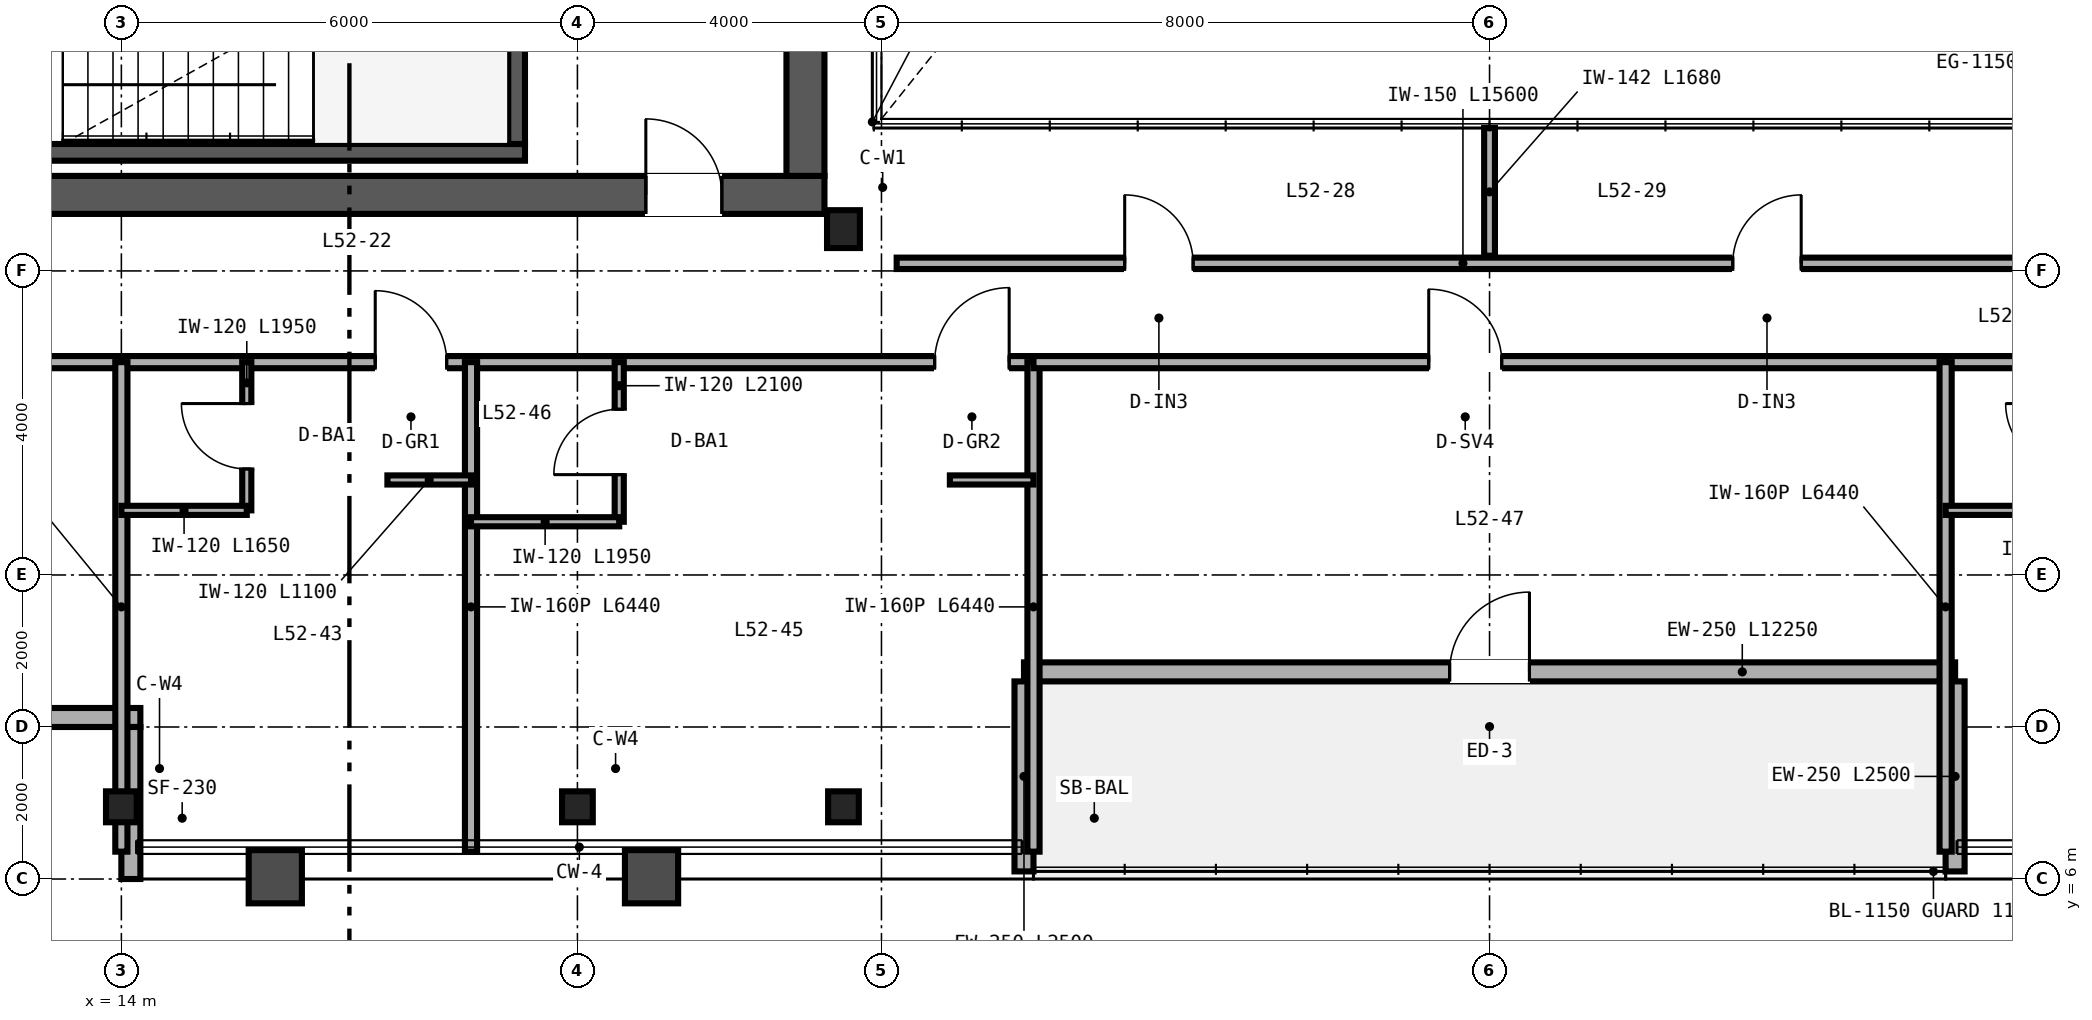
"""IFC4 building model, lengths in metres.
Left out: names, types, materials, properties, quantities, classifications, styles, units other than length and angle.
Written with IfcOpenShell. Run it as: python <this file> out.ifc"""

import sys

from ifc_helpers import new_model, si_unit, direction, frame, frame_2d, origin, origin_2d, place, context, subcontext, project, spatial, rectangle, i_section, extrude, source, transform, mapped, element, fill, save


model = new_model("IFC4")
c1 = context("Model", 3, precision=1e-05, world=origin(), true_north=direction((0.0, 1.0)))
c2 = subcontext(c1, "Body", "Model", "MODEL_VIEW")
j1 = project(units=[si_unit("LENGTHUNIT", "METRE"), si_unit("PLANEANGLEUNIT", "RADIAN")], contexts=[c1])
p1 = place(None, origin())
s1 = spatial("IfcSite", under=j1, at=p1, CompositionType="ELEMENT")
p2 = place(p1, origin())
s2 = spatial("IfcBuilding", under=s1, at=p2, CompositionType="ELEMENT")
p3 = place(p2, frame((0.0, 0.0, 206.4)))
s3 = spatial("IfcBuildingStorey", under=s2, at=p3, CompositionType="ELEMENT", Elevation=206.4)
p4 = place(p3, frame((10.75, 15.0, 0.0), z_axis=(0.0, 0.0, 1.0), x_axis=(1.0, 0.0, 0.0)))
e1 = element("IfcWall", 1, at=p4, inside=s3, PredefinedType="SHEAR", context=c2, shape_type="SweptSolid", body=[
    extrude(rectangle(XDim=12.5, YDim=0.5, at=frame_2d((6.25, 0.0))), origin(), (0.0, 0.0, 1.0), 3.37),
])
p5 = place(p4, frame((10.15, 0.0, 0.0)))
e2 = element("IfcOpeningElement", 2, at=p5, cuts=e1, PredefinedType="OPENING", context=c2, shape_type="SweptSolid", body=[
    extrude(rectangle(XDim=1.0, YDim=2.15, at=frame_2d((0.5, 1.075))), frame((0.0, 0.26, 0.0), z_axis=(0.0, -1.0, 0.0), x_axis=(1.0, 0.0, 0.0)), (0.0, 0.0, 1.0), 0.52),
])
p6 = place(p3, frame((23.0, 15.25, 0.0), z_axis=(0.0, 0.0, 1.0), x_axis=(0.0, 1.0, 0.0)))
e3 = element("IfcWall", 3, at=p6, inside=s3, PredefinedType="SHEAR", context=c2, shape_type="SweptSolid", body=[
    extrude(rectangle(XDim=21.5, YDim=0.5, at=frame_2d((10.75, 0.0))), origin(), (0.0, 0.0, 1.0), 3.37),
])
p7 = place(p3, frame((11.25, 15.56, 0.0), z_axis=(0.0, 0.0, 1.0), x_axis=(1.0, 0.0, 0.0)))
e4 = element("IfcWall", 4, at=p7, inside=s3, PredefinedType="SHEAR", context=c2, shape_type="SweptSolid", body=[
    extrude(rectangle(XDim=8.06, YDim=0.22, at=frame_2d((4.03, 0.0))), origin(), (0.0, 0.0, 1.0), 3.4),
])
p8 = place(p3, frame((19.2, 15.67, 0.0), z_axis=(0.0, 0.0, 1.0), x_axis=(0.0, 1.0, 0.0)))
e5 = element("IfcWall", 5, at=p8, inside=s3, PredefinedType="SHEAR", context=c2, shape_type="SweptSolid", body=[
    extrude(rectangle(XDim=3.28, YDim=0.22, at=frame_2d((1.64, 0.0))), origin(), (0.0, 0.0, 1.0), 3.4),
])
m1 = source(origin(), c2, "Body", "SweptSolid", [
    extrude(i_section(OverallWidth=0.432, OverallDepth=0.498, WebThickness=0.056, FlangeThickness=0.089, FilletRadius=0.025, at=origin_2d()), origin(), (0.0, 0.0, 1.0), 3.37),
])
p9 = place(p3, frame((23.5, 14.55, 0.0), z_axis=(0.0, 0.0, 1.0), x_axis=(1.0, 0.0, 0.0)))
e6 = element("IfcColumn", 6, at=p9, inside=s3, PredefinedType="COLUMN", context=c2, shape_type="MappedRepresentation", body=[
    mapped(m1, transform((0.0, 0.0, 0.0), scale=1.0)),
])
m2 = source(origin(), c2, "Body", "SweptSolid", [
    extrude(i_section(OverallWidth=0.404, OverallDepth=0.407, WebThickness=0.027, FlangeThickness=0.044, FilletRadius=0.025, at=origin_2d()), origin(), (0.0, 0.0, 1.0), 3.37),
])
for number, where, z_axis, x_axis in (
    (7, (14.0, 6.95, 0.0), (0.0, 0.0, 1.0), (1.0, 0.0, 0.0)),
    (8, (20.0, 6.95, 0.0), (0.0, 0.0, 1.0), (1.0, 0.0, 0.0)),
    (9, (23.5, 6.95, 0.0), (0.0, 0.0, 1.0), (1.0, 0.0, 0.0)),
):
    element("IfcColumn", number, at=place(p3, frame(where, z_axis=z_axis, x_axis=x_axis)), inside=s3, PredefinedType="COLUMN", context=c2, shape_type="MappedRepresentation", body=[
        mapped(m2, transform((0.0, 0.0, 0.0), scale=1.0)),
    ])
p10 = place(p3, frame((12.25, 8.125, 0.0), z_axis=(0.0, 0.0, 1.0), x_axis=(1.0, 0.0, 0.0)))
e10 = element("IfcWall", 10, at=p10, inside=s3, PredefinedType="SOLIDWALL", context=c2, shape_type="SweptSolid", body=[
    extrude(rectangle(XDim=2.0, YDim=0.25, at=frame_2d((1.0, 0.0))), origin(), (0.0, 0.0, 1.0), 3.37),
])
p11 = place(p3, frame((14.125, 8.0, 0.0), z_axis=(0.0, 0.0, 1.0), x_axis=(0.0, -1.0, 0.0)))
e11 = element("IfcWall", 11, at=p11, inside=s3, PredefinedType="SOLIDWALL", context=c2, shape_type="SweptSolid", body=[
    extrude(rectangle(XDim=2.0, YDim=0.25, at=frame_2d((1.0, 0.0))), origin(), (0.0, 0.0, 1.0), 2.677),
])
p12 = place(p3, frame((25.875, 8.725, 0.0), z_axis=(0.0, 0.0, 1.0), x_axis=(1.0, 0.0, 0.0)))
e12 = element("IfcWall", 12, at=p12, inside=s3, PredefinedType="SOLIDWALL", context=c2, shape_type="SweptSolid", body=[
    extrude(rectangle(XDim=12.25, YDim=0.25, at=frame_2d((6.125, 0.0))), origin(), (0.0, 0.0, 1.0), 3.37),
])
p13 = place(p12, frame((5.6, 0.0, 0.0)))
e13 = element("IfcOpeningElement", 13, at=p13, cuts=e12, PredefinedType="OPENING", context=c2, shape_type="SweptSolid", body=[
    extrude(rectangle(XDim=1.05, YDim=2.15, at=frame_2d((0.525, 1.075))), frame((0.0, 0.135, 0.0), z_axis=(0.0, -1.0, 0.0), x_axis=(1.0, 0.0, 0.0)), (0.0, 0.0, 1.0), 0.27),
])
for number, where, z_axis, x_axis in (
    (14, (25.875, 6.1, 0.0), (0.0, 0.0, 1.0), (0.0, 1.0, 0.0)),
    (15, (38.125, 6.1, 0.0), (0.0, 0.0, 1.0), (0.0, 1.0, 0.0)),
):
    element("IfcWall", number, at=place(p3, frame(where, z_axis=z_axis, x_axis=x_axis)), inside=s3, PredefinedType="SOLIDWALL", context=c2, shape_type="SweptSolid", body=[
        extrude(rectangle(XDim=2.5, YDim=0.25, at=frame_2d((1.25, 0.0))), origin(), (0.0, 0.0, 1.0), 2.443),
    ])
p14 = place(p3, frame((24.2, 14.1, 0.0), z_axis=(0.0, 0.0, 1.0), x_axis=(1.0, 0.0, 0.0)))
e16 = element("IfcWall", 16, at=p14, inside=s3, PredefinedType="PARTITIONING", context=c2, shape_type="SweptSolid", body=[
    extrude(rectangle(XDim=15.6, YDim=0.15, at=frame_2d((7.8, 0.0))), origin(), (0.0, 0.0, 1.0), 3.37),
])
p15 = place(p14, frame((3.0, 0.0, 0.0)))
e17 = element("IfcOpeningElement", 17, at=p15, cuts=e16, PredefinedType="OPENING", context=c2, shape_type="SweptSolid", body=[
    extrude(rectangle(XDim=0.9, YDim=2.15, at=frame_2d((0.45, 1.075))), frame((0.0, 0.085, 0.0), z_axis=(0.0, -1.0, 0.0), x_axis=(1.0, 0.0, 0.0)), (0.0, 0.0, 1.0), 0.17),
])
p16 = place(p14, frame((11.0, 0.0, 0.0)))
e18 = element("IfcOpeningElement", 18, at=p16, cuts=e16, PredefinedType="OPENING", context=c2, shape_type="SweptSolid", body=[
    extrude(rectangle(XDim=0.9, YDim=2.15, at=frame_2d((0.45, 1.075))), frame((0.0, 0.085, 0.0), z_axis=(0.0, -1.0, 0.0), x_axis=(1.0, 0.0, 0.0)), (0.0, 0.0, 1.0), 0.17),
])
p17 = place(p3, frame((32.0, 14.2, 0.0), z_axis=(0.0, 0.0, 1.0), x_axis=(0.0, 1.0, 0.0)))
e19 = element("IfcWall", 19, at=p17, inside=s3, PredefinedType="PARTITIONING", context=c2, shape_type="SweptSolid", body=[
    extrude(rectangle(XDim=1.68, YDim=0.142, at=frame_2d((0.84, 0.0))), origin(), (0.0, 0.0, 1.0), 3.37),
])
p18 = place(p3, frame((10.0, 12.8, 0.0), z_axis=(0.0, 0.0, 1.0), x_axis=(1.0, 0.0, 0.0)))
e20 = element("IfcWall", 20, at=p18, inside=s3, PredefinedType="PARTITIONING", context=c2, shape_type="SweptSolid", body=[
    extrude(rectangle(XDim=4.0, YDim=0.16, at=frame_2d((2.0, 0.0))), origin(), (0.0, 0.0, 1.0), 3.37),
])
p19 = place(p18, frame((1.52, 0.0, 0.0)))
e21 = element("IfcOpeningElement", 21, at=p19, cuts=e20, PredefinedType="OPENING", context=c2, shape_type="SweptSolid", body=[
    extrude(rectangle(XDim=0.96, YDim=2.15, at=frame_2d((0.48, 1.075))), frame((0.0, 0.09, 0.0), z_axis=(0.0, -1.0, 0.0), x_axis=(1.0, 0.0, 0.0)), (0.0, 0.0, 1.0), 0.18),
])
p20 = place(p3, frame((14.0, 12.8, 0.0), z_axis=(0.0, 0.0, 1.0), x_axis=(1.0, 0.0, 0.0)))
e22 = element("IfcWall", 22, at=p20, inside=s3, PredefinedType="PARTITIONING", context=c2, shape_type="SweptSolid", body=[
    extrude(rectangle(XDim=12.0, YDim=0.16, at=frame_2d((6.0, 0.0))), origin(), (0.0, 0.0, 1.0), 2.913),
])
p21 = place(p20, frame((3.34, 0.0, 0.0)))
e23 = element("IfcOpeningElement", 23, at=p21, cuts=e22, PredefinedType="OPENING", context=c2, shape_type="SweptSolid", body=[
    extrude(rectangle(XDim=0.94, YDim=2.15, at=frame_2d((0.47, 1.075))), frame((0.0, 0.09, 0.0), z_axis=(0.0, -1.0, 0.0), x_axis=(1.0, 0.0, 0.0)), (0.0, 0.0, 1.0), 0.18),
])
p22 = place(p20, frame((10.7, 0.0, 0.0)))
e24 = element("IfcOpeningElement", 24, at=p22, cuts=e22, PredefinedType="OPENING", context=c2, shape_type="SweptSolid", body=[
    extrude(rectangle(XDim=0.98, YDim=2.2, at=frame_2d((0.49, 1.1))), frame((0.0, 0.09, 0.0), z_axis=(0.0, -1.0, 0.0), x_axis=(1.0, 0.0, 0.0)), (0.0, 0.0, 1.0), 0.18),
])
p23 = place(p3, frame((14.0, 6.36, 0.0), z_axis=(0.0, 0.0, 1.0), x_axis=(0.0, 1.0, 0.0)))
e25 = element("IfcWall", 25, at=p23, inside=s3, PredefinedType="PARTITIONING", context=c2, shape_type="SweptSolid", body=[
    extrude(rectangle(XDim=6.44, YDim=0.16, at=frame_2d((3.22, 0.0))), origin(), (0.0, 0.0, 1.0), 2.677),
])
p24 = place(p3, frame((26.0, 6.36, 0.0), z_axis=(0.0, 0.0, 1.0), x_axis=(0.0, 1.0, 0.0)))
e26 = element("IfcWall", 26, at=p24, inside=s3, PredefinedType="PARTITIONING", context=c2, shape_type="SweptSolid", body=[
    extrude(rectangle(XDim=6.44, YDim=0.16, at=frame_2d((3.22, 0.0))), origin(), (0.0, 0.0, 1.0), 2.443),
])
p25 = place(p3, frame((18.6, 6.36, 0.0), z_axis=(0.0, 0.0, 1.0), x_axis=(0.0, 1.0, 0.0)))
e27 = element("IfcWall", 27, at=p25, inside=s3, PredefinedType="PARTITIONING", context=c2, shape_type="SweptSolid", body=[
    extrude(rectangle(XDim=6.44, YDim=0.16, at=frame_2d((3.22, 0.0))), origin(), (0.0, 0.0, 1.0), 2.677),
])
p26 = place(p3, frame((15.65, 10.85, 0.0), z_axis=(0.0, 0.0, 1.0), x_axis=(0.0, 1.0, 0.0)))
e28 = element("IfcWall", 28, at=p26, inside=s3, PredefinedType="PARTITIONING", context=c2, shape_type="SweptSolid", body=[
    extrude(rectangle(XDim=1.95, YDim=0.12, at=frame_2d((0.975, 0.0))), origin(), (0.0, 0.0, 1.0), 3.37),
])
p27 = place(p26, frame((0.545, 0.0, 0.0)))
e29 = element("IfcOpeningElement", 29, at=p27, cuts=e28, PredefinedType="OPENING", context=c2, shape_type="SweptSolid", body=[
    extrude(rectangle(XDim=0.86, YDim=2.1, at=frame_2d((0.43, 1.05))), frame((0.0, 0.07, 0.0), z_axis=(0.0, -1.0, 0.0), x_axis=(1.0, 0.0, 0.0)), (0.0, 0.0, 1.0), 0.14),
])
p28 = place(p3, frame((14.0, 10.85, 0.0), z_axis=(0.0, 0.0, 1.0), x_axis=(1.0, 0.0, 0.0)))
e30 = element("IfcWall", 30, at=p28, inside=s3, PredefinedType="PARTITIONING", context=c2, shape_type="SweptSolid", body=[
    extrude(rectangle(XDim=1.65, YDim=0.12, at=frame_2d((0.825, 0.0))), origin(), (0.0, 0.0, 1.0), 3.37),
])
p29 = place(p3, frame((17.5, 11.25, 0.0), z_axis=(0.0, 0.0, 1.0), x_axis=(1.0, 0.0, 0.0)))
e31 = element("IfcWall", 31, at=p29, inside=s3, PredefinedType="PARTITIONING", context=c2, shape_type="SweptSolid", body=[
    extrude(rectangle(XDim=1.1, YDim=0.12, at=frame_2d((0.55, 0.0))), origin(), (0.0, 0.0, 1.0), 3.37),
])
p30 = place(p3, frame((20.55, 10.7, 0.0), z_axis=(0.0, 0.0, 1.0), x_axis=(0.0, 1.0, 0.0)))
e32 = element("IfcWall", 32, at=p30, inside=s3, PredefinedType="PARTITIONING", context=c2, shape_type="SweptSolid", body=[
    extrude(rectangle(XDim=2.1, YDim=0.12, at=frame_2d((1.05, 0.0))), origin(), (0.0, 0.0, 1.0), 3.37),
])
p31 = place(p30, frame((0.62, 0.0, 0.0)))
e33 = element("IfcOpeningElement", 33, at=p31, cuts=e32, PredefinedType="OPENING", context=c2, shape_type="SweptSolid", body=[
    extrude(rectangle(XDim=0.86, YDim=2.1, at=frame_2d((0.43, 1.05))), frame((0.0, 0.07, 0.0), z_axis=(0.0, -1.0, 0.0), x_axis=(1.0, 0.0, 0.0)), (0.0, 0.0, 1.0), 0.14),
])
p32 = place(p3, frame((18.6, 10.7, 0.0), z_axis=(0.0, 0.0, 1.0), x_axis=(1.0, 0.0, 0.0)))
e34 = element("IfcWall", 34, at=p32, inside=s3, PredefinedType="PARTITIONING", context=c2, shape_type="SweptSolid", body=[
    extrude(rectangle(XDim=1.95, YDim=0.12, at=frame_2d((0.975, 0.0))), origin(), (0.0, 0.0, 1.0), 3.37),
])
p33 = place(p3, frame((24.9, 11.25, 0.0), z_axis=(0.0, 0.0, 1.0), x_axis=(1.0, 0.0, 0.0)))
e35 = element("IfcWall", 35, at=p33, inside=s3, PredefinedType="PARTITIONING", context=c2, shape_type="SweptSolid", body=[
    extrude(rectangle(XDim=1.1, YDim=0.12, at=frame_2d((0.55, 0.0))), origin(), (0.0, 0.0, 1.0), 3.37),
])
p34 = place(p3, frame((26.0, 12.8, 0.0), z_axis=(0.0, 0.0, 1.0), x_axis=(1.0, 0.0, 0.0)))
e36 = element("IfcWall", 36, at=p34, inside=s3, PredefinedType="PARTITIONING", context=c2, shape_type="SweptSolid", body=[
    extrude(rectangle(XDim=12.0, YDim=0.16, at=frame_2d((6.0, 0.0))), origin(), (0.0, 0.0, 1.0), 3.37),
])
p35 = place(p34, frame((5.2, 0.0, 0.0)))
e37 = element("IfcOpeningElement", 37, at=p35, cuts=e36, PredefinedType="OPENING", context=c2, shape_type="SweptSolid", body=[
    extrude(rectangle(XDim=0.96, YDim=2.15, at=frame_2d((0.48, 1.075))), frame((0.0, 0.09, 0.0), z_axis=(0.0, -1.0, 0.0), x_axis=(1.0, 0.0, 0.0)), (0.0, 0.0, 1.0), 0.18),
])
p36 = place(p3, frame((38.0, 12.8, 0.0), z_axis=(0.0, 0.0, 1.0), x_axis=(1.0, 0.0, 0.0)))
e38 = element("IfcWall", 38, at=p36, inside=s3, PredefinedType="PARTITIONING", context=c2, shape_type="SweptSolid", body=[
    extrude(rectangle(XDim=12.0, YDim=0.16, at=frame_2d((6.0, 0.0))), origin(), (0.0, 0.0, 1.0), 2.913),
])
p37 = place(p36, frame((3.14, 0.0, 0.0)))
e39 = element("IfcOpeningElement", 39, at=p37, cuts=e38, PredefinedType="OPENING", context=c2, shape_type="SweptSolid", body=[
    extrude(rectangle(XDim=0.94, YDim=2.15, at=frame_2d((0.47, 1.075))), frame((0.0, 0.09, 0.0), z_axis=(0.0, -1.0, 0.0), x_axis=(1.0, 0.0, 0.0)), (0.0, 0.0, 1.0), 0.18),
])
p38 = place(p36, frame((6.94, 0.0, 0.0)))
e40 = element("IfcOpeningElement", 40, at=p38, cuts=e38, PredefinedType="OPENING", context=c2, shape_type="SweptSolid", body=[
    extrude(rectangle(XDim=0.94, YDim=2.15, at=frame_2d((0.47, 1.075))), frame((0.0, 0.09, 0.0), z_axis=(0.0, -1.0, 0.0), x_axis=(1.0, 0.0, 0.0)), (0.0, 0.0, 1.0), 0.18),
])
p39 = place(p36, frame((10.74, 0.0, 0.0)))
e41 = element("IfcOpeningElement", 41, at=p39, cuts=e38, PredefinedType="OPENING", context=c2, shape_type="SweptSolid", body=[
    extrude(rectangle(XDim=0.94, YDim=2.15, at=frame_2d((0.47, 1.075))), frame((0.0, 0.09, 0.0), z_axis=(0.0, -1.0, 0.0), x_axis=(1.0, 0.0, 0.0)), (0.0, 0.0, 1.0), 0.18),
])
p40 = place(p3, frame((38.0, 6.36, 0.0), z_axis=(0.0, 0.0, 1.0), x_axis=(0.0, 1.0, 0.0)))
e42 = element("IfcWall", 42, at=p40, inside=s3, PredefinedType="PARTITIONING", context=c2, shape_type="SweptSolid", body=[
    extrude(rectangle(XDim=6.44, YDim=0.16, at=frame_2d((3.22, 0.0))), origin(), (0.0, 0.0, 1.0), 2.443),
])
p41 = place(p3, frame((38.0, 10.85, 0.0), z_axis=(0.0, 0.0, 1.0), x_axis=(1.0, 0.0, 0.0)))
e43 = element("IfcWall", 43, at=p41, inside=s3, PredefinedType="PARTITIONING", context=c2, shape_type="SweptSolid", body=[
    extrude(rectangle(XDim=1.65, YDim=0.12, at=frame_2d((0.825, 0.0))), origin(), (0.0, 0.0, 1.0), 3.37),
])
m3 = source(origin(), c2, "Body", "SweptSolid", [
    extrude(rectangle(XDim=1.05, YDim=2.15, at=frame_2d((0.525, 1.075))), frame((0.0, 0.025, 0.0), z_axis=(0.0, -1.0, 0.0), x_axis=(1.0, 0.0, 0.0)), (0.0, 0.0, 1.0), 0.05),
])
p42 = place(p13, origin())
e44 = element("IfcDoor", 44, at=p42, inside=s3, OperationType="SINGLE_SWING_RIGHT", PredefinedType="DOOR", context=c2, shape_type="MappedRepresentation", body=[
    mapped(m3, transform((0.0, 0.0, 0.0), scale=1.0)),
])
fill(e13, e44)
m4 = source(origin(), c2, "Body", "SweptSolid", [
    extrude(rectangle(XDim=1.0, YDim=2.15, at=frame_2d((0.5, 1.075))), frame((0.0, 0.025, 0.0), z_axis=(0.0, -1.0, 0.0), x_axis=(1.0, 0.0, 0.0)), (0.0, 0.0, 1.0), 0.05),
])
p43 = place(p5, origin())
e45 = element("IfcDoor", 45, at=p43, inside=s3, OperationType="SINGLE_SWING_LEFT", PredefinedType="DOOR", context=c2, shape_type="MappedRepresentation", body=[
    mapped(m4, transform((0.0, 0.0, 0.0), scale=1.0)),
])
fill(e2, e45)
m5 = source(origin(), c2, "Body", "SweptSolid", [
    extrude(rectangle(XDim=0.9, YDim=2.15, at=frame_2d((0.45, 1.075))), frame((0.0, 0.025, 0.0), z_axis=(0.0, -1.0, 0.0), x_axis=(1.0, 0.0, 0.0)), (0.0, 0.0, 1.0), 0.05),
])
p44 = place(p15, origin())
e46 = element("IfcDoor", 46, at=p44, inside=s3, OperationType="SINGLE_SWING_LEFT", PredefinedType="DOOR", context=c2, shape_type="MappedRepresentation", body=[
    mapped(m5, transform((0.0, 0.0, 0.0), scale=1.0)),
])
fill(e17, e46)
p45 = place(p16, origin())
e47 = element("IfcDoor", 47, at=p45, inside=s3, OperationType="SINGLE_SWING_RIGHT", PredefinedType="DOOR", context=c2, shape_type="MappedRepresentation", body=[
    mapped(m5, transform((0.0, 0.0, 0.0), scale=1.0)),
])
fill(e18, e47)
m6 = source(origin(), c2, "Body", "SweptSolid", [
    extrude(rectangle(XDim=0.86, YDim=2.1, at=frame_2d((0.43, 1.05))), frame((0.0, 0.025, 0.0), z_axis=(0.0, -1.0, 0.0), x_axis=(1.0, 0.0, 0.0)), (0.0, 0.0, 1.0), 0.05),
])
p46 = place(p27, origin())
e48 = element("IfcDoor", 48, at=p46, inside=s3, OperationType="SINGLE_SWING_RIGHT", PredefinedType="DOOR", context=c2, shape_type="MappedRepresentation", body=[
    mapped(m6, transform((0.0, 0.0, 0.0), scale=1.0)),
])
fill(e29, e48)
p47 = place(p31, origin())
e49 = element("IfcDoor", 49, at=p47, inside=s3, OperationType="SINGLE_SWING_LEFT", PredefinedType="DOOR", context=c2, shape_type="MappedRepresentation", body=[
    mapped(m6, transform((0.0, 0.0, 0.0), scale=1.0)),
])
fill(e33, e49)
m7 = source(origin(), c2, "Body", "SweptSolid", [
    extrude(rectangle(XDim=0.94, YDim=2.15, at=frame_2d((0.47, 1.075))), frame((0.0, 0.025, 0.0), z_axis=(0.0, -1.0, 0.0), x_axis=(1.0, 0.0, 0.0)), (0.0, 0.0, 1.0), 0.05),
])
p48 = place(p21, origin())
e50 = element("IfcDoor", 50, at=p48, inside=s3, OperationType="SINGLE_SWING_LEFT", PredefinedType="DOOR", context=c2, shape_type="MappedRepresentation", body=[
    mapped(m7, transform((0.0, 0.0, 0.0), scale=1.0)),
])
fill(e23, e50)
m8 = source(origin(), c2, "Body", "SweptSolid", [
    extrude(rectangle(XDim=0.98, YDim=2.2, at=frame_2d((0.49, 1.1))), frame((0.0, 0.025, 0.0), z_axis=(0.0, -1.0, 0.0), x_axis=(1.0, 0.0, 0.0)), (0.0, 0.0, 1.0), 0.05),
])
p49 = place(p22, origin())
e51 = element("IfcDoor", 51, at=p49, inside=s3, OperationType="SINGLE_SWING_RIGHT", PredefinedType="DOOR", context=c2, shape_type="MappedRepresentation", body=[
    mapped(m8, transform((0.0, 0.0, 0.0), scale=1.0)),
])
fill(e24, e51)
m9 = source(origin(), c2, "Body", "SweptSolid", [
    extrude(rectangle(XDim=0.96, YDim=2.15, at=frame_2d((0.48, 1.075))), frame((0.0, 0.025, 0.0), z_axis=(0.0, -1.0, 0.0), x_axis=(1.0, 0.0, 0.0)), (0.0, 0.0, 1.0), 0.05),
])
p50 = place(p35, origin())
e52 = element("IfcDoor", 52, at=p50, inside=s3, OperationType="SINGLE_SWING_LEFT", PredefinedType="DOOR", context=c2, shape_type="MappedRepresentation", body=[
    mapped(m9, transform((0.0, 0.0, 0.0), scale=1.0)),
])
fill(e37, e52)
save(model, sys.argv[1])
